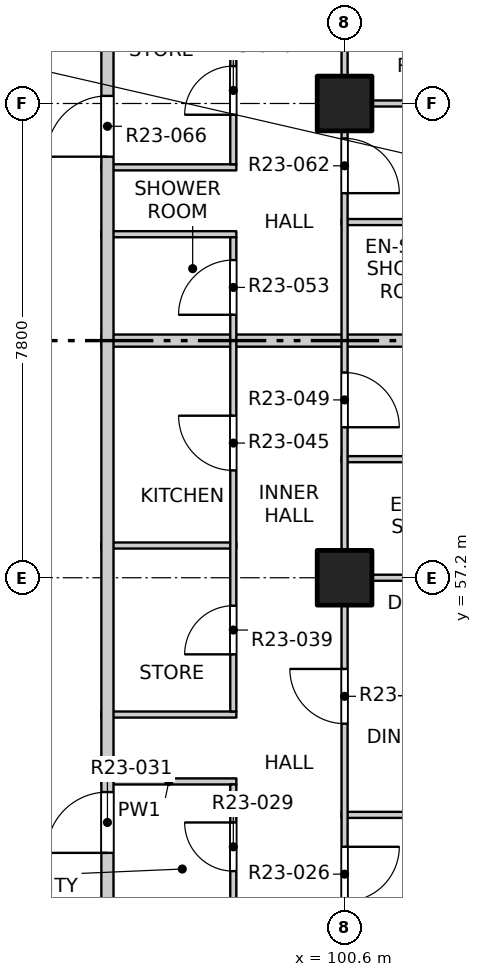
"""IFC4 building model, lengths in metres.
Left out: names, types, materials, properties, quantities, classifications, styles, units other than length and angle.
Written with IfcOpenShell. Run it as: python <this file> out.ifc"""

import sys

from ifc_helpers import new_model, si_unit, direction, frame, frame_2d, origin, origin_2d, place, context, subcontext, project, spatial, rectangle, extrude, element, fill, save


model = new_model("IFC4")
c1 = context("Model", 3, precision=1e-05, world=origin(), true_north=direction((0.0, 1.0)))
c2 = subcontext(c1, "Body", "Model", "MODEL_VIEW")
j1 = project(units=[si_unit("LENGTHUNIT", "METRE"), si_unit("PLANEANGLEUNIT", "RADIAN")], contexts=[c1])
p1 = place(None, origin())
s1 = spatial("IfcSite", under=j1, at=p1, CompositionType="ELEMENT")
p2 = place(p1, origin())
s2 = spatial("IfcBuilding", under=s1, at=p2, CompositionType="ELEMENT")
p3 = place(p2, frame((0.0, 0.0, 234.7)))
s3 = spatial("IfcBuildingStorey", under=s2, at=p3, CompositionType="ELEMENT", Elevation=234.7)
for number, where, z_axis, x_axis in (
    (1, (100.6, 57.2, -0.25), (0.0, 0.0, 1.0), (1.0, 0.0, 0.0)),
    (2, (100.6, 65.0, -0.25), (0.0, 0.0, 1.0), (1.0, 0.0, 0.0)),
):
    element("IfcColumn", number, at=place(p3, frame(where, z_axis=z_axis, x_axis=x_axis)), inside=s3, PredefinedType="COLUMN", context=c2, shape_type="SweptSolid", body=[
        extrude(rectangle(XDim=0.9, YDim=0.9, at=origin_2d()), origin(), (0.0, 0.0, 1.0), 3.4),
    ])
p4 = place(p3, frame((100.55, 53.3, 0.0), z_axis=(0.0, 0.0, 1.0), x_axis=(1.0, 0.0, 0.0)))
e3 = element("IfcWall", 3, at=p4, inside=s3, PredefinedType="PARTITIONING", context=c2, shape_type="SweptSolid", body=[
    extrude(rectangle(XDim=7.55, YDim=0.1, at=frame_2d((3.775, 0.0))), origin(), (0.0, 0.0, 1.0), 3.15),
])
for number, where, z_axis, x_axis in (
    (4, (96.6, 53.85, 0.0), (0.0, 0.0, 1.0), (1.0, 0.0, 0.0)),
    (5, (96.6, 54.95, 0.0), (0.0, 0.0, 1.0), (1.0, 0.0, 0.0)),
):
    element("IfcWall", number, at=place(p3, frame(where, z_axis=z_axis, x_axis=x_axis)), inside=s3, PredefinedType="PARTITIONING", context=c2, shape_type="SweptSolid", body=[
        extrude(rectangle(XDim=2.22, YDim=0.1, at=frame_2d((1.11, 0.0))), origin(), (0.0, 0.0, 1.0), 3.15),
    ])
p5 = place(p3, frame((100.55, 57.2, 0.0), z_axis=(0.0, 0.0, 1.0), x_axis=(1.0, 0.0, 0.0)))
e6 = element("IfcWall", 6, at=p5, inside=s3, PredefinedType="PARTITIONING", context=c2, shape_type="SweptSolid", body=[
    extrude(rectangle(XDim=7.55, YDim=0.1, at=frame_2d((3.775, 0.0))), origin(), (0.0, 0.0, 1.0), 3.15),
])
p6 = place(p3, frame((96.6, 57.73, 0.0), z_axis=(0.0, 0.0, 1.0), x_axis=(1.0, 0.0, 0.0)))
e7 = element("IfcWall", 7, at=p6, inside=s3, PredefinedType="PARTITIONING", context=c2, shape_type="SweptSolid", body=[
    extrude(rectangle(XDim=2.22, YDim=0.1, at=frame_2d((1.11, 0.0))), origin(), (0.0, 0.0, 1.0), 3.15),
])
p7 = place(p3, frame((100.55, 59.15, 0.0), z_axis=(0.0, 0.0, 1.0), x_axis=(1.0, 0.0, 0.0)))
e8 = element("IfcWall", 8, at=p7, inside=s3, PredefinedType="PARTITIONING", context=c2, shape_type="SweptSolid", body=[
    extrude(rectangle(XDim=3.7, YDim=0.1, at=frame_2d((1.85, 0.0))), origin(), (0.0, 0.0, 1.0), 3.15),
])
p8 = place(p3, frame((96.6, 61.1, 0.0), z_axis=(0.0, 0.0, 1.0), x_axis=(1.0, 0.0, 0.0)))
e9 = element("IfcWall", 9, at=p8, inside=s3, PredefinedType="PARTITIONING", context=c2, shape_type="SweptSolid", body=[
    extrude(rectangle(XDim=11.5, YDim=0.2, at=frame_2d((5.75, 0.0))), origin(), (0.0, 0.0, 1.0), 2.55),
])
p9 = place(p3, frame((96.6, 62.85, 0.0), z_axis=(0.0, 0.0, 1.0), x_axis=(1.0, 0.0, 0.0)))
e10 = element("IfcWall", 10, at=p9, inside=s3, PredefinedType="PARTITIONING", context=c2, shape_type="SweptSolid", body=[
    extrude(rectangle(XDim=2.22, YDim=0.1, at=frame_2d((1.11, 0.0))), origin(), (0.0, 0.0, 1.0), 3.15),
])
p10 = place(p3, frame((100.55, 63.05, 0.0), z_axis=(0.0, 0.0, 1.0), x_axis=(1.0, 0.0, 0.0)))
e11 = element("IfcWall", 11, at=p10, inside=s3, PredefinedType="PARTITIONING", context=c2, shape_type="SweptSolid", body=[
    extrude(rectangle(XDim=3.4, YDim=0.1, at=frame_2d((1.7, 0.0))), origin(), (0.0, 0.0, 1.0), 3.15),
])
p11 = place(p3, frame((96.6, 63.95, 0.0), z_axis=(0.0, 0.0, 1.0), x_axis=(1.0, 0.0, 0.0)))
e12 = element("IfcWall", 12, at=p11, inside=s3, PredefinedType="PARTITIONING", context=c2, shape_type="SweptSolid", body=[
    extrude(rectangle(XDim=2.22, YDim=0.1, at=frame_2d((1.11, 0.0))), origin(), (0.0, 0.0, 1.0), 3.15),
])
p12 = place(p3, frame((100.55, 65.0, 0.0), z_axis=(0.0, 0.0, 1.0), x_axis=(1.0, 0.0, 0.0)))
e13 = element("IfcWall", 13, at=p12, inside=s3, PredefinedType="PARTITIONING", context=c2, shape_type="SweptSolid", body=[
    extrude(rectangle(XDim=7.55, YDim=0.1, at=frame_2d((3.775, 0.0))), origin(), (0.0, 0.0, 1.0), 3.15),
])
p13 = place(p3, frame((96.7, 49.5, 0.0), z_axis=(0.0, 0.0, 1.0), x_axis=(0.0, 1.0, 0.0)))
e14 = element("IfcWall", 14, at=p13, inside=s3, PredefinedType="PARTITIONING", context=c2, shape_type="SweptSolid", body=[
    extrude(rectangle(XDim=34.9, YDim=0.2, at=frame_2d((17.45, 0.0))), origin(), (0.0, 0.0, 1.0), 3.15),
])
p14 = place(p13, frame((3.175, 0.0, 0.0)))
e15 = element("IfcOpeningElement", 15, at=p14, cuts=e14, PredefinedType="OPENING", context=c2, shape_type="SweptSolid", body=[
    extrude(rectangle(XDim=1.0, YDim=2.1, at=frame_2d((0.5, 1.05))), frame((0.0, 0.11, 0.0), z_axis=(0.0, -1.0, 0.0), x_axis=(1.0, 0.0, 0.0)), (0.0, 0.0, 1.0), 0.22),
])
p15 = place(p13, frame((14.625, 0.0, 0.0)))
e16 = element("IfcOpeningElement", 16, at=p15, cuts=e14, PredefinedType="OPENING", context=c2, shape_type="SweptSolid", body=[
    extrude(rectangle(XDim=1.0, YDim=2.1, at=frame_2d((0.5, 1.05))), frame((0.0, 0.11, 0.0), z_axis=(0.0, -1.0, 0.0), x_axis=(1.0, 0.0, 0.0)), (0.0, 0.0, 1.0), 0.22),
])
p16 = place(p13, frame((30.175, 0.0, 0.0)))
e17 = element("IfcOpeningElement", 17, at=p16, cuts=e14, PredefinedType="OPENING", context=c2, shape_type="SweptSolid", body=[
    extrude(rectangle(XDim=1.0, YDim=2.1, at=frame_2d((0.5, 1.05))), frame((0.0, 0.11, 0.0), z_axis=(0.0, -1.0, 0.0), x_axis=(1.0, 0.0, 0.0)), (0.0, 0.0, 1.0), 0.22),
])
p17 = place(p3, frame((98.77, 45.55, 0.0), z_axis=(0.0, 0.0, 1.0), x_axis=(0.0, 1.0, 0.0)))
e18 = element("IfcWall", 18, at=p17, inside=s3, PredefinedType="PARTITIONING", context=c2, shape_type="SweptSolid", body=[
    extrude(rectangle(XDim=8.25, YDim=0.1, at=frame_2d((4.125, 0.0))), origin(), (0.0, 0.0, 1.0), 3.15),
])
p18 = place(p17, frame((0.625, 0.0, 0.0)))
e19 = element("IfcOpeningElement", 19, at=p18, cuts=e18, PredefinedType="OPENING", context=c2, shape_type="SweptSolid", body=[
    extrude(rectangle(XDim=0.8, YDim=2.1, at=frame_2d((0.4, 1.05))), frame((0.0, 0.06, 0.0), z_axis=(0.0, -1.0, 0.0), x_axis=(1.0, 0.0, 0.0)), (0.0, 0.0, 1.0), 0.12),
])
p19 = place(p17, frame((2.55, 0.0, 0.0)))
e20 = element("IfcOpeningElement", 20, at=p19, cuts=e18, PredefinedType="OPENING", context=c2, shape_type="SweptSolid", body=[
    extrude(rectangle(XDim=0.9, YDim=2.1, at=frame_2d((0.45, 1.05))), frame((0.0, 0.06, 0.0), z_axis=(0.0, -1.0, 0.0), x_axis=(1.0, 0.0, 0.0)), (0.0, 0.0, 1.0), 0.12),
])
p20 = place(p17, frame((4.575, 0.0, 0.0)))
e21 = element("IfcOpeningElement", 21, at=p20, cuts=e18, PredefinedType="OPENING", context=c2, shape_type="SweptSolid", body=[
    extrude(rectangle(XDim=0.9, YDim=2.1, at=frame_2d((0.45, 1.05))), frame((0.0, 0.06, 0.0), z_axis=(0.0, -1.0, 0.0), x_axis=(1.0, 0.0, 0.0)), (0.0, 0.0, 1.0), 0.12),
])
p21 = place(p17, frame((6.825, 0.0, 0.0)))
e22 = element("IfcOpeningElement", 22, at=p21, cuts=e18, PredefinedType="OPENING", context=c2, shape_type="SweptSolid", body=[
    extrude(rectangle(XDim=0.8, YDim=2.1, at=frame_2d((0.4, 1.05))), frame((0.0, 0.06, 0.0), z_axis=(0.0, -1.0, 0.0), x_axis=(1.0, 0.0, 0.0)), (0.0, 0.0, 1.0), 0.12),
])
p22 = place(p3, frame((98.77, 55.0, 0.0), z_axis=(0.0, 0.0, 1.0), x_axis=(0.0, 1.0, 0.0)))
e23 = element("IfcWall", 23, at=p22, inside=s3, PredefinedType="PARTITIONING", context=c2, shape_type="SweptSolid", body=[
    extrude(rectangle(XDim=7.8, YDim=0.1, at=frame_2d((3.9, 0.0))), origin(), (0.0, 0.0, 1.0), 3.15),
])
p23 = place(p22, frame((0.94, 0.0, 0.0)))
e24 = element("IfcOpeningElement", 24, at=p23, cuts=e23, PredefinedType="OPENING", context=c2, shape_type="SweptSolid", body=[
    extrude(rectangle(XDim=0.8, YDim=2.1, at=frame_2d((0.4, 1.05))), frame((0.0, 0.06, 0.0), z_axis=(0.0, -1.0, 0.0), x_axis=(1.0, 0.0, 0.0)), (0.0, 0.0, 1.0), 0.12),
])
p24 = place(p22, frame((3.965, 0.0, 0.0)))
e25 = element("IfcOpeningElement", 25, at=p24, cuts=e23, PredefinedType="OPENING", context=c2, shape_type="SweptSolid", body=[
    extrude(rectangle(XDim=0.9, YDim=2.1, at=frame_2d((0.45, 1.05))), frame((0.0, 0.06, 0.0), z_axis=(0.0, -1.0, 0.0), x_axis=(1.0, 0.0, 0.0)), (0.0, 0.0, 1.0), 0.12),
])
p25 = place(p22, frame((6.525, 0.0, 0.0)))
e26 = element("IfcOpeningElement", 26, at=p25, cuts=e23, PredefinedType="OPENING", context=c2, shape_type="SweptSolid", body=[
    extrude(rectangle(XDim=0.9, YDim=2.1, at=frame_2d((0.45, 1.05))), frame((0.0, 0.06, 0.0), z_axis=(0.0, -1.0, 0.0), x_axis=(1.0, 0.0, 0.0)), (0.0, 0.0, 1.0), 0.12),
])
p26 = place(p3, frame((98.77, 64.0, 0.0), z_axis=(0.0, 0.0, 1.0), x_axis=(0.0, 1.0, 0.0)))
e27 = element("IfcWall", 27, at=p26, inside=s3, PredefinedType="PARTITIONING", context=c2, shape_type="SweptSolid", body=[
    extrude(rectangle(XDim=14.35, YDim=0.1, at=frame_2d((7.175, 0.0))), origin(), (0.0, 0.0, 1.0), 3.15),
])
p27 = place(p26, frame((0.815, 0.0, 0.0)))
e28 = element("IfcOpeningElement", 28, at=p27, cuts=e27, PredefinedType="OPENING", context=c2, shape_type="SweptSolid", body=[
    extrude(rectangle(XDim=0.8, YDim=2.1, at=frame_2d((0.4, 1.05))), frame((0.0, 0.06, 0.0), z_axis=(0.0, -1.0, 0.0), x_axis=(1.0, 0.0, 0.0)), (0.0, 0.0, 1.0), 0.12),
])
p28 = place(p26, frame((3.23, 0.0, 0.0)))
e29 = element("IfcOpeningElement", 29, at=p28, cuts=e27, PredefinedType="OPENING", context=c2, shape_type="SweptSolid", body=[
    extrude(rectangle(XDim=0.9, YDim=2.1, at=frame_2d((0.45, 1.05))), frame((0.0, 0.06, 0.0), z_axis=(0.0, -1.0, 0.0), x_axis=(1.0, 0.0, 0.0)), (0.0, 0.0, 1.0), 0.12),
])
p29 = place(p26, frame((5.63, 0.0, 0.0)))
e30 = element("IfcOpeningElement", 30, at=p29, cuts=e27, PredefinedType="OPENING", context=c2, shape_type="SweptSolid", body=[
    extrude(rectangle(XDim=0.8, YDim=2.1, at=frame_2d((0.4, 1.05))), frame((0.0, 0.06, 0.0), z_axis=(0.0, -1.0, 0.0), x_axis=(1.0, 0.0, 0.0)), (0.0, 0.0, 1.0), 0.12),
])
p30 = place(p26, frame((8.265, 0.0, 0.0)))
e31 = element("IfcOpeningElement", 31, at=p30, cuts=e27, PredefinedType="OPENING", context=c2, shape_type="SweptSolid", body=[
    extrude(rectangle(XDim=0.9, YDim=2.1, at=frame_2d((0.45, 1.05))), frame((0.0, 0.06, 0.0), z_axis=(0.0, -1.0, 0.0), x_axis=(1.0, 0.0, 0.0)), (0.0, 0.0, 1.0), 0.12),
])
p31 = place(p26, frame((11.075, 0.0, 0.0)))
e32 = element("IfcOpeningElement", 32, at=p31, cuts=e27, PredefinedType="OPENING", context=c2, shape_type="SweptSolid", body=[
    extrude(rectangle(XDim=0.8, YDim=2.1, at=frame_2d((0.4, 1.05))), frame((0.0, 0.06, 0.0), z_axis=(0.0, -1.0, 0.0), x_axis=(1.0, 0.0, 0.0)), (0.0, 0.0, 1.0), 0.12),
])
p32 = place(p26, frame((13.15, 0.0, 0.0)))
e33 = element("IfcOpeningElement", 33, at=p32, cuts=e27, PredefinedType="OPENING", context=c2, shape_type="SweptSolid", body=[
    extrude(rectangle(XDim=0.8, YDim=2.1, at=frame_2d((0.4, 1.05))), frame((0.0, 0.06, 0.0), z_axis=(0.0, -1.0, 0.0), x_axis=(1.0, 0.0, 0.0)), (0.0, 0.0, 1.0), 0.12),
])
p33 = place(p3, frame((100.6, 41.9, 0.0), z_axis=(0.0, 0.0, 1.0), x_axis=(0.0, 1.0, 0.0)))
e34 = element("IfcWall", 34, at=p33, inside=s3, PredefinedType="PARTITIONING", context=c2, shape_type="SweptSolid", body=[
    extrude(rectangle(XDim=46.2, YDim=0.1, at=frame_2d((23.1, 0.0))), origin(), (0.0, 0.0, 1.0), 3.15),
])
p34 = place(p33, frame((1.2, 0.0, 0.0)))
e35 = element("IfcOpeningElement", 35, at=p34, cuts=e34, PredefinedType="OPENING", context=c2, shape_type="SweptSolid", body=[
    extrude(rectangle(XDim=0.9, YDim=2.1, at=frame_2d((0.45, 1.05))), frame((0.0, 0.06, 0.0), z_axis=(0.0, -1.0, 0.0), x_axis=(1.0, 0.0, 0.0)), (0.0, 0.0, 1.0), 0.12),
])
p35 = place(p33, frame((6.025, 0.0, 0.0)))
e36 = element("IfcOpeningElement", 36, at=p35, cuts=e34, PredefinedType="OPENING", context=c2, shape_type="SweptSolid", body=[
    extrude(rectangle(XDim=0.9, YDim=2.1, at=frame_2d((0.45, 1.05))), frame((0.0, 0.06, 0.0), z_axis=(0.0, -1.0, 0.0), x_axis=(1.0, 0.0, 0.0)), (0.0, 0.0, 1.0), 0.12),
])
p36 = place(p33, frame((9.975, 0.0, 0.0)))
e37 = element("IfcOpeningElement", 37, at=p36, cuts=e34, PredefinedType="OPENING", context=c2, shape_type="SweptSolid", body=[
    extrude(rectangle(XDim=0.9, YDim=2.1, at=frame_2d((0.45, 1.05))), frame((0.0, 0.06, 0.0), z_axis=(0.0, -1.0, 0.0), x_axis=(1.0, 0.0, 0.0)), (0.0, 0.0, 1.0), 0.12),
])
p37 = place(p33, frame((12.9, 0.0, 0.0)))
e38 = element("IfcOpeningElement", 38, at=p37, cuts=e34, PredefinedType="OPENING", context=c2, shape_type="SweptSolid", body=[
    extrude(rectangle(XDim=0.9, YDim=2.1, at=frame_2d((0.45, 1.05))), frame((0.0, 0.06, 0.0), z_axis=(0.0, -1.0, 0.0), x_axis=(1.0, 0.0, 0.0)), (0.0, 0.0, 1.0), 0.12),
])
p38 = place(p33, frame((17.775, 0.0, 0.0)))
e39 = element("IfcOpeningElement", 39, at=p38, cuts=e34, PredefinedType="OPENING", context=c2, shape_type="SweptSolid", body=[
    extrude(rectangle(XDim=0.9, YDim=2.1, at=frame_2d((0.45, 1.05))), frame((0.0, 0.06, 0.0), z_axis=(0.0, -1.0, 0.0), x_axis=(1.0, 0.0, 0.0)), (0.0, 0.0, 1.0), 0.12),
])
p39 = place(p33, frame((21.625, 0.0, 0.0)))
e40 = element("IfcOpeningElement", 40, at=p39, cuts=e34, PredefinedType="OPENING", context=c2, shape_type="SweptSolid", body=[
    extrude(rectangle(XDim=0.9, YDim=2.1, at=frame_2d((0.45, 1.05))), frame((0.0, 0.06, 0.0), z_axis=(0.0, -1.0, 0.0), x_axis=(1.0, 0.0, 0.0)), (0.0, 0.0, 1.0), 0.12),
])
p40 = place(p33, frame((25.575, 0.0, 0.0)))
e41 = element("IfcOpeningElement", 41, at=p40, cuts=e34, PredefinedType="OPENING", context=c2, shape_type="SweptSolid", body=[
    extrude(rectangle(XDim=0.9, YDim=2.1, at=frame_2d((0.45, 1.05))), frame((0.0, 0.06, 0.0), z_axis=(0.0, -1.0, 0.0), x_axis=(1.0, 0.0, 0.0)), (0.0, 0.0, 1.0), 0.12),
])
p41 = place(p33, frame((28.5, 0.0, 0.0)))
e42 = element("IfcOpeningElement", 42, at=p41, cuts=e34, PredefinedType="OPENING", context=c2, shape_type="SweptSolid", body=[
    extrude(rectangle(XDim=0.9, YDim=2.1, at=frame_2d((0.45, 1.05))), frame((0.0, 0.06, 0.0), z_axis=(0.0, -1.0, 0.0), x_axis=(1.0, 0.0, 0.0)), (0.0, 0.0, 1.0), 0.12),
])
p42 = place(p33, frame((33.375, 0.0, 0.0)))
e43 = element("IfcOpeningElement", 43, at=p42, cuts=e34, PredefinedType="OPENING", context=c2, shape_type="SweptSolid", body=[
    extrude(rectangle(XDim=0.9, YDim=2.1, at=frame_2d((0.45, 1.05))), frame((0.0, 0.06, 0.0), z_axis=(0.0, -1.0, 0.0), x_axis=(1.0, 0.0, 0.0)), (0.0, 0.0, 1.0), 0.12),
])
p43 = place(p33, frame((36.3, 0.0, 0.0)))
e44 = element("IfcOpeningElement", 44, at=p43, cuts=e34, PredefinedType="OPENING", context=c2, shape_type="SweptSolid", body=[
    extrude(rectangle(XDim=0.9, YDim=2.1, at=frame_2d((0.45, 1.05))), frame((0.0, 0.06, 0.0), z_axis=(0.0, -1.0, 0.0), x_axis=(1.0, 0.0, 0.0)), (0.0, 0.0, 1.0), 0.12),
])
p44 = place(p33, frame((40.2, 0.0, 0.0)))
e45 = element("IfcOpeningElement", 45, at=p44, cuts=e34, PredefinedType="OPENING", context=c2, shape_type="SweptSolid", body=[
    extrude(rectangle(XDim=0.9, YDim=2.1, at=frame_2d((0.45, 1.05))), frame((0.0, 0.06, 0.0), z_axis=(0.0, -1.0, 0.0), x_axis=(1.0, 0.0, 0.0)), (0.0, 0.0, 1.0), 0.12),
])
p45 = place(p33, frame((44.1, 0.0, 0.0)))
e46 = element("IfcOpeningElement", 46, at=p45, cuts=e34, PredefinedType="OPENING", context=c2, shape_type="SweptSolid", body=[
    extrude(rectangle(XDim=0.9, YDim=2.1, at=frame_2d((0.45, 1.05))), frame((0.0, 0.06, 0.0), z_axis=(0.0, -1.0, 0.0), x_axis=(1.0, 0.0, 0.0)), (0.0, 0.0, 1.0), 0.12),
])
p46 = place(p36, origin())
e47 = element("IfcDoor", 47, at=p46, inside=s3, OperationType="SINGLE_SWING_LEFT", PredefinedType="DOOR", context=c2, shape_type="SweptSolid", body=[
    extrude(rectangle(XDim=0.9, YDim=2.1, at=frame_2d((0.45, 1.05))), frame((0.0, 0.025, 0.0), z_axis=(0.0, -1.0, 0.0), x_axis=(1.0, 0.0, 0.0)), (0.0, 0.0, 1.0), 0.05),
])
fill(e37, e47)
p47 = place(p21, origin())
e48 = element("IfcDoor", 48, at=p47, inside=s3, OperationType="SINGLE_SWING_RIGHT", PredefinedType="DOOR", context=c2, shape_type="SweptSolid", body=[
    extrude(rectangle(XDim=0.8, YDim=2.1, at=frame_2d((0.4, 1.05))), frame((0.0, 0.025, 0.0), z_axis=(0.0, -1.0, 0.0), x_axis=(1.0, 0.0, 0.0)), (0.0, 0.0, 1.0), 0.05),
])
fill(e22, e48)
p48 = place(p14, origin())
e49 = element("IfcDoor", 49, at=p48, inside=s3, OperationType="SINGLE_SWING_RIGHT", PredefinedType="DOOR", context=c2, shape_type="SweptSolid", body=[
    extrude(rectangle(XDim=1.0, YDim=2.1, at=frame_2d((0.5, 1.05))), frame((0.0, 0.025, 0.0), z_axis=(0.0, -1.0, 0.0), x_axis=(1.0, 0.0, 0.0)), (0.0, 0.0, 1.0), 0.05),
])
fill(e15, e49)
p49 = place(p37, origin())
e50 = element("IfcDoor", 50, at=p49, inside=s3, OperationType="SINGLE_SWING_RIGHT", PredefinedType="DOOR", context=c2, shape_type="SweptSolid", body=[
    extrude(rectangle(XDim=0.9, YDim=2.1, at=frame_2d((0.45, 1.05))), frame((0.0, 0.025, 0.0), z_axis=(0.0, -1.0, 0.0), x_axis=(1.0, 0.0, 0.0)), (0.0, 0.0, 1.0), 0.05),
])
fill(e38, e50)
p50 = place(p23, origin())
e51 = element("IfcDoor", 51, at=p50, inside=s3, OperationType="SINGLE_SWING_LEFT", PredefinedType="DOOR", context=c2, shape_type="SweptSolid", body=[
    extrude(rectangle(XDim=0.8, YDim=2.1, at=frame_2d((0.4, 1.05))), frame((0.0, 0.025, 0.0), z_axis=(0.0, -1.0, 0.0), x_axis=(1.0, 0.0, 0.0)), (0.0, 0.0, 1.0), 0.05),
])
fill(e24, e51)
p51 = place(p24, origin())
e52 = element("IfcDoor", 52, at=p51, inside=s3, OperationType="SINGLE_SWING_RIGHT", PredefinedType="DOOR", context=c2, shape_type="SweptSolid", body=[
    extrude(rectangle(XDim=0.9, YDim=2.1, at=frame_2d((0.45, 1.05))), frame((0.0, 0.025, 0.0), z_axis=(0.0, -1.0, 0.0), x_axis=(1.0, 0.0, 0.0)), (0.0, 0.0, 1.0), 0.05),
])
fill(e25, e52)
p52 = place(p38, origin())
e53 = element("IfcDoor", 53, at=p52, inside=s3, OperationType="SINGLE_SWING_RIGHT", PredefinedType="DOOR", context=c2, shape_type="SweptSolid", body=[
    extrude(rectangle(XDim=0.9, YDim=2.1, at=frame_2d((0.45, 1.05))), frame((0.0, 0.025, 0.0), z_axis=(0.0, -1.0, 0.0), x_axis=(1.0, 0.0, 0.0)), (0.0, 0.0, 1.0), 0.05),
])
fill(e39, e53)
p53 = place(p25, origin())
e54 = element("IfcDoor", 54, at=p53, inside=s3, OperationType="SINGLE_SWING_LEFT", PredefinedType="DOOR", context=c2, shape_type="SweptSolid", body=[
    extrude(rectangle(XDim=0.9, YDim=2.1, at=frame_2d((0.45, 1.05))), frame((0.0, 0.025, 0.0), z_axis=(0.0, -1.0, 0.0), x_axis=(1.0, 0.0, 0.0)), (0.0, 0.0, 1.0), 0.05),
])
fill(e26, e54)
p54 = place(p39, origin())
e55 = element("IfcDoor", 55, at=p54, inside=s3, OperationType="SINGLE_SWING_RIGHT", PredefinedType="DOOR", context=c2, shape_type="SweptSolid", body=[
    extrude(rectangle(XDim=0.9, YDim=2.1, at=frame_2d((0.45, 1.05))), frame((0.0, 0.025, 0.0), z_axis=(0.0, -1.0, 0.0), x_axis=(1.0, 0.0, 0.0)), (0.0, 0.0, 1.0), 0.05),
])
fill(e40, e55)
p55 = place(p15, origin())
e56 = element("IfcDoor", 56, at=p55, inside=s3, OperationType="SINGLE_SWING_LEFT", PredefinedType="DOOR", context=c2, shape_type="SweptSolid", body=[
    extrude(rectangle(XDim=1.0, YDim=2.1, at=frame_2d((0.5, 1.05))), frame((0.0, 0.025, 0.0), z_axis=(0.0, -1.0, 0.0), x_axis=(1.0, 0.0, 0.0)), (0.0, 0.0, 1.0), 0.05),
])
fill(e16, e56)
p56 = place(p27, origin())
e57 = element("IfcDoor", 57, at=p56, inside=s3, OperationType="SINGLE_SWING_LEFT", PredefinedType="DOOR", context=c2, shape_type="SweptSolid", body=[
    extrude(rectangle(XDim=0.8, YDim=2.1, at=frame_2d((0.4, 1.05))), frame((0.0, 0.025, 0.0), z_axis=(0.0, -1.0, 0.0), x_axis=(1.0, 0.0, 0.0)), (0.0, 0.0, 1.0), 0.05),
])
fill(e28, e57)
save(model, sys.argv[1])
